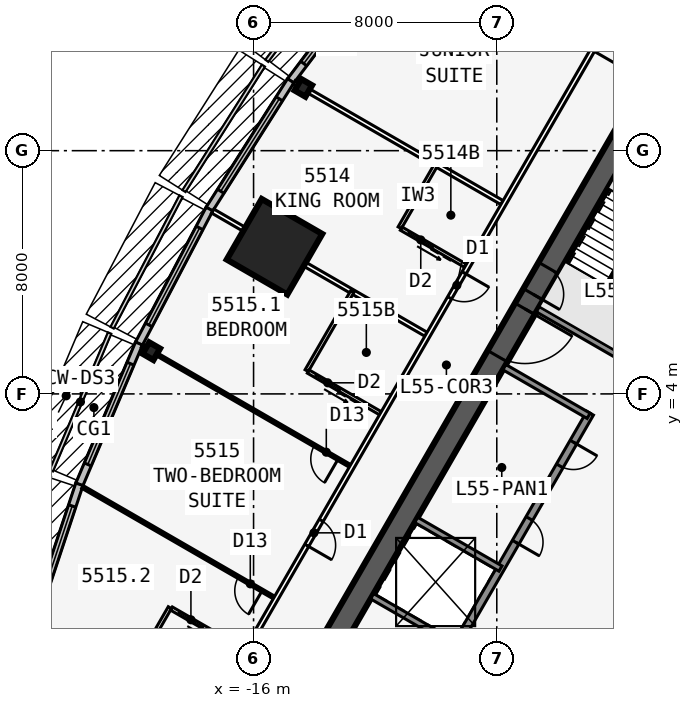
"""IFC4 building model, lengths in metres.
Left out: names, types, materials, properties, quantities, classifications, styles, units other than length and angle.
Written with IfcOpenShell. Run it as: python <this file> out.ifc"""

import sys

from ifc_helpers import new_model, si_unit, direction, frame, frame_2d, origin, origin_2d, place, context, subcontext, project, spatial, rectangle, i_section, extrude, element, fill, save


model = new_model("IFC4")
c1 = context("Model", 3, precision=1e-05, world=origin(), true_north=direction((0.0, 1.0)))
c2 = subcontext(c1, "Body", "Model", "MODEL_VIEW")
j1 = project(units=[si_unit("LENGTHUNIT", "METRE"), si_unit("PLANEANGLEUNIT", "RADIAN")], contexts=[c1])
p1 = place(None, origin())
s1 = spatial("IfcSite", under=j1, at=p1, CompositionType="ELEMENT")
p2 = place(p1, origin())
s2 = spatial("IfcBuilding", under=s1, at=p2, CompositionType="ELEMENT")
p3 = place(p2, frame((0.0, 0.0, 208.1)))
s3 = spatial("IfcBuildingStorey", under=s2, at=p3, CompositionType="ELEMENT", Elevation=208.1)
p4 = place(p3, frame((0.0, 19.052, 0.0), z_axis=(0.0, 0.0, 1.0), x_axis=(-0.499999749417, -0.866025548458, 0.0)))
e1 = element("IfcWall", 1, at=p4, inside=s3, PredefinedType="SHEAR", context=c2, shape_type="SweptSolid", body=[
    extrude(rectangle(XDim=33.0, YDim=0.75, at=frame_2d((16.5, 0.0))), origin(), (0.0, 0.0, 1.0), 3.6),
])
p5 = place(p4, frame((14.15, 0.0, 0.0)))
e2 = element("IfcOpeningElement", 2, at=p5, cuts=e1, PredefinedType="OPENING", context=c2, shape_type="SweptSolid", body=[
    extrude(rectangle(XDim=1.8, YDim=2.13, at=frame_2d((0.9, 1.065))), frame((0.0, 0.385, 0.0), z_axis=(0.0, -1.0, 0.0), x_axis=(1.0, 0.0, 0.0)), (0.0, 0.0, 1.0), 0.77),
])
p6 = place(p4, frame((12.6, 0.0, 0.0)))
e3 = element("IfcOpeningElement", 3, at=p6, cuts=e1, PredefinedType="OPENING", context=c2, shape_type="SweptSolid", body=[
    extrude(rectangle(XDim=1.0, YDim=2.13, at=frame_2d((0.5, 1.065))), frame((0.0, 0.385, 0.0), z_axis=(0.0, -1.0, 0.0), x_axis=(1.0, 0.0, 0.0)), (0.0, 0.0, 1.0), 0.77),
])
p7 = place(p3, frame((-4.929, 3.365, 0.0), z_axis=(0.0, 0.0, 1.0), x_axis=(-0.499991433582, -0.866030349552, 0.0)))
e4 = element("IfcWall", 4, at=p7, inside=s3, PredefinedType="SOLIDWALL", context=c2, shape_type="SweptSolid", body=[
    extrude(rectangle(XDim=10.633, YDim=0.25, at=frame_2d((5.316, 0.0))), origin(), (0.0, 0.0, 1.0), 3.435),
])
p8 = place(p7, frame((9.164, 0.0, 0.0)))
e5 = element("IfcOpeningElement", 5, at=p8, cuts=e4, PredefinedType="OPENING", context=c2, shape_type="SweptSolid", body=[
    extrude(rectangle(XDim=0.9, YDim=2.13, at=frame_2d((0.45, 1.065))), frame((0.0, 0.135, 0.0), z_axis=(0.0, -1.0, 0.0), x_axis=(1.0, 0.0, 0.0)), (0.0, 0.0, 1.0), 0.27),
])
p9 = place(p7, frame((1.1, 0.0, 0.0)))
e6 = element("IfcOpeningElement", 6, at=p9, cuts=e4, PredefinedType="OPENING", context=c2, shape_type="SweptSolid", body=[
    extrude(rectangle(XDim=0.9, YDim=2.13, at=frame_2d((0.45, 1.065))), frame((0.0, 0.135, 0.0), z_axis=(0.0, -1.0, 0.0), x_axis=(1.0, 0.0, 0.0)), (0.0, 0.0, 1.0), 0.27),
])
p10 = place(p7, frame((4.0, 0.0, 0.0)))
e7 = element("IfcOpeningElement", 7, at=p10, cuts=e4, PredefinedType="OPENING", context=c2, shape_type="SweptSolid", body=[
    extrude(rectangle(XDim=0.9, YDim=2.13, at=frame_2d((0.45, 1.065))), frame((0.0, 0.135, 0.0), z_axis=(0.0, -1.0, 0.0), x_axis=(1.0, 0.0, 0.0)), (0.0, 0.0, 1.0), 0.27),
])
for number, where, z_axis, x_axis in (
    (8, (-3.879, 5.184, 0.0), (0.0, 0.0, 1.0), (-0.866, 0.5, 0.0)),
    (9, (-4.979, 3.279, 0.0), (0.0, 0.0, 1.0), (-0.866, 0.5, 0.0)),
    (10, (-7.879, -1.744, 0.0), (0.0, 0.0, 1.0), (-0.866, 0.5, 0.0)),
):
    element("IfcWall", number, at=place(p3, frame(where, z_axis=z_axis, x_axis=x_axis)), inside=s3, PredefinedType="SOLIDWALL", context=c2, shape_type="SweptSolid", body=[
        extrude(rectangle(XDim=3.2, YDim=0.2, at=frame_2d((1.6, 0.0))), origin(), (0.0, 0.0, 1.0), 3.435),
    ])
p11 = place(p3, frame((-9.329, -4.256, 0.0), z_axis=(0.0, 0.0, 1.0), x_axis=(-0.866022944154, 0.50000426018, 0.0)))
e11 = element("IfcWall", 11, at=p11, inside=s3, PredefinedType="SOLIDWALL", context=c2, shape_type="SweptSolid", body=[
    extrude(rectangle(XDim=3.2, YDim=0.2, at=frame_2d((1.6, 0.0))), origin(), (0.0, 0.0, 1.0), 3.435),
])
for number, where, z_axis, x_axis in (
    (12, (-14.363, 14.066, 0.0), (0.0, 0.0, 1.0), (-0.866, 0.5, 0.0)),
    (13, (-19.363, 5.406, 0.0), (0.0, 0.0, 1.0), (-0.866, 0.5, 0.0)),
):
    element("IfcColumn", number, at=place(p3, frame(where, z_axis=z_axis, x_axis=x_axis)), inside=s3, PredefinedType="COLUMN", context=c2, shape_type="SweptSolid", body=[
        extrude(i_section(OverallWidth=0.411, OverallDepth=0.434, WebThickness=0.036, FlangeThickness=0.057, at=origin_2d()), origin(), (0.0, 0.0, 1.0), 3.6),
    ])
p12 = place(p3, frame((-15.312, 8.84, 0.0), z_axis=(0.0, 0.0, 1.0), x_axis=(-0.866025403784, 0.5, 0.0)))
e14 = element("IfcColumn", 14, at=p12, inside=s3, PredefinedType="COLUMN", context=c2, shape_type="SweptSolid", body=[
    extrude(rectangle(XDim=2.3, YDim=2.3, at=origin_2d()), origin(), (0.0, 0.0, 1.0), 3.6),
])
p13 = place(p3, frame((-11.748, 18.312, 0.0), z_axis=(0.0, 0.0, 1.0), x_axis=(-0.602408653511, -0.798187831388, 0.0)))
e15 = element("IfcWall", 15, at=p13, inside=s3, PredefinedType="STANDARD", context=c2, shape_type="SweptSolid", body=[
    extrude(rectangle(XDim=5.038, YDim=0.25, at=frame_2d((2.519, 0.0))), origin(), (0.0, 0.0, 1.0), 3.435),
])
p14 = place(p13, frame((0.719, 0.0, 0.45)))
e16 = element("IfcOpeningElement", 16, at=p14, cuts=e15, PredefinedType="OPENING", context=c2, shape_type="SweptSolid", body=[
    extrude(rectangle(XDim=3.6, YDim=2.6, at=frame_2d((1.8, 1.3))), frame((0.0, 0.135, 0.0), z_axis=(0.0, -1.0, 0.0), x_axis=(1.0, 0.0, 0.0)), (0.0, 0.0, 1.0), 0.27),
])
p15 = place(p3, frame((-14.777, 14.299, 0.0), z_axis=(0.0, 0.0, 1.0), x_axis=(-0.535220361449, -0.844712474568, 0.0)))
e17 = element("IfcWall", 17, at=p15, inside=s3, PredefinedType="STANDARD", context=c2, shape_type="SweptSolid", body=[
    extrude(rectangle(XDim=5.004, YDim=0.25, at=frame_2d((2.502, 0.0))), origin(), (0.0, 0.0, 1.0), 3.435),
])
p16 = place(p15, frame((0.702, 0.0, 0.45)))
e18 = element("IfcOpeningElement", 18, at=p16, cuts=e17, PredefinedType="OPENING", context=c2, shape_type="SweptSolid", body=[
    extrude(rectangle(XDim=3.6, YDim=2.6, at=frame_2d((1.8, 1.3))), frame((0.0, 0.135, 0.0), z_axis=(0.0, -1.0, 0.0), x_axis=(1.0, 0.0, 0.0)), (0.0, 0.0, 1.0), 0.27),
])
p17 = place(p3, frame((-17.45, 10.081, 0.0), z_axis=(0.0, 0.0, 1.0), x_axis=(-0.463976002579, -0.885847768542, 0.0)))
e19 = element("IfcWall", 19, at=p17, inside=s3, PredefinedType="STANDARD", context=c2, shape_type="SweptSolid", body=[
    extrude(rectangle(XDim=5.004, YDim=0.25, at=frame_2d((2.502, 0.0))), origin(), (0.0, 0.0, 1.0), 3.435),
])
p18 = place(p17, frame((0.702, 0.0, 0.45)))
e20 = element("IfcOpeningElement", 20, at=p18, cuts=e19, PredefinedType="OPENING", context=c2, shape_type="SweptSolid", body=[
    extrude(rectangle(XDim=3.6, YDim=2.6, at=frame_2d((1.8, 1.3))), frame((0.0, 0.135, 0.0), z_axis=(0.0, -1.0, 0.0), x_axis=(1.0, 0.0, 0.0)), (0.0, 0.0, 1.0), 0.27),
])
p19 = place(p3, frame((-19.768, 5.657, 0.0), z_axis=(0.0, 0.0, 1.0), x_axis=(-0.390096809471, -0.920773848044, 0.0)))
e21 = element("IfcWall", 21, at=p19, inside=s3, PredefinedType="STANDARD", context=c2, shape_type="SweptSolid", body=[
    extrude(rectangle(XDim=5.038, YDim=0.25, at=frame_2d((2.519, 0.0))), origin(), (0.0, 0.0, 1.0), 3.435),
])
p20 = place(p19, frame((0.719, 0.0, 0.45)))
e22 = element("IfcOpeningElement", 22, at=p20, cuts=e21, PredefinedType="OPENING", context=c2, shape_type="SweptSolid", body=[
    extrude(rectangle(XDim=3.6, YDim=2.6, at=frame_2d((1.8, 1.3))), frame((0.0, 0.135, 0.0), z_axis=(0.0, -1.0, 0.0), x_axis=(1.0, 0.0, 0.0)), (0.0, 0.0, 1.0), 0.27),
])
p21 = place(p3, frame((-21.729, 1.028, 0.0), z_axis=(0.0, 0.0, 1.0), x_axis=(-0.315108478109, -0.949055660656, 0.0)))
e23 = element("IfcWall", 23, at=p21, inside=s3, PredefinedType="STANDARD", context=c2, shape_type="SweptSolid", body=[
    extrude(rectangle(XDim=5.105, YDim=0.25, at=frame_2d((2.552, 0.0))), origin(), (0.0, 0.0, 1.0), 3.435),
])
p22 = place(p21, frame((0.752, 0.0, 0.45)))
e24 = element("IfcOpeningElement", 24, at=p22, cuts=e23, PredefinedType="OPENING", context=c2, shape_type="SweptSolid", body=[
    extrude(rectangle(XDim=3.6, YDim=2.6, at=frame_2d((1.8, 1.3))), frame((0.0, 0.135, 0.0), z_axis=(0.0, -1.0, 0.0), x_axis=(1.0, 0.0, 0.0)), (0.0, 0.0, 1.0), 0.27),
])
p23 = place(p3, frame((-0.425, 22.966, 0.0), z_axis=(0.0, 0.0, 1.0), x_axis=(-0.500000265775, -0.866025250339, 0.0)))
e25 = element("IfcWall", 25, at=p23, inside=s3, PredefinedType="PARTITIONING", context=c2, shape_type="SweptSolid", body=[
    extrude(rectangle(XDim=39.354, YDim=0.15, at=frame_2d((19.677, 0.0))), origin(), (0.0, 0.0, 1.0), 3.435),
])
p24 = place(p23, frame((1.102, 0.0, 0.0)))
e26 = element("IfcOpeningElement", 26, at=p24, cuts=e25, PredefinedType="OPENING", context=c2, shape_type="SweptSolid", body=[
    extrude(rectangle(XDim=0.95, YDim=2.13, at=frame_2d((0.475, 1.065))), frame((0.0, 0.085, 0.0), z_axis=(0.0, -1.0, 0.0), x_axis=(1.0, 0.0, 0.0)), (0.0, 0.0, 1.0), 0.17),
])
p25 = place(p23, frame((7.902, 0.0, 0.0)))
e27 = element("IfcOpeningElement", 27, at=p25, cuts=e25, PredefinedType="OPENING", context=c2, shape_type="SweptSolid", body=[
    extrude(rectangle(XDim=0.95, YDim=2.13, at=frame_2d((0.475, 1.065))), frame((0.0, 0.085, 0.0), z_axis=(0.0, -1.0, 0.0), x_axis=(1.0, 0.0, 0.0)), (0.0, 0.0, 1.0), 0.17),
])
p26 = place(p23, frame((17.302, 0.0, 0.0)))
e28 = element("IfcOpeningElement", 28, at=p26, cuts=e25, PredefinedType="OPENING", context=c2, shape_type="SweptSolid", body=[
    extrude(rectangle(XDim=0.95, YDim=2.13, at=frame_2d((0.475, 1.065))), frame((0.0, 0.085, 0.0), z_axis=(0.0, -1.0, 0.0), x_axis=(1.0, 0.0, 0.0)), (0.0, 0.0, 1.0), 0.17),
])
p27 = place(p23, frame((26.702, 0.0, 0.0)))
e29 = element("IfcOpeningElement", 29, at=p27, cuts=e25, PredefinedType="OPENING", context=c2, shape_type="SweptSolid", body=[
    extrude(rectangle(XDim=0.95, YDim=2.13, at=frame_2d((0.475, 1.065))), frame((0.0, 0.085, 0.0), z_axis=(0.0, -1.0, 0.0), x_axis=(1.0, 0.0, 0.0)), (0.0, 0.0, 1.0), 0.17),
])
p28 = place(p23, frame((37.302, 0.0, 0.0)))
e30 = element("IfcOpeningElement", 30, at=p28, cuts=e25, PredefinedType="OPENING", context=c2, shape_type="SweptSolid", body=[
    extrude(rectangle(XDim=0.95, YDim=2.13, at=frame_2d((0.475, 1.065))), frame((0.0, 0.085, 0.0), z_axis=(0.0, -1.0, 0.0), x_axis=(1.0, 0.0, 0.0)), (0.0, 0.0, 1.0), 0.17),
])
p29 = place(p3, frame((-7.829, 10.293, 0.0), z_axis=(0.0, 0.0, 1.0), x_axis=(-0.866030558329, 0.49999107196, 0.0)))
e31 = element("IfcWall", 31, at=p29, inside=s3, PredefinedType="PARTITIONING", context=c2, shape_type="SweptSolid", body=[
    extrude(rectangle(XDim=7.894, YDim=0.15, at=frame_2d((3.947, 0.0))), origin(), (0.0, 0.0, 1.0), 2.589),
])
p30 = place(p3, frame((-10.329, 5.963, 0.0), z_axis=(0.0, 0.0, 1.0), x_axis=(-0.866016460812, 0.500015489362, 0.0)))
e32 = element("IfcWall", 32, at=p30, inside=s3, PredefinedType="PARTITIONING", context=c2, shape_type="SweptSolid", body=[
    extrude(rectangle(XDim=8.101, YDim=0.15, at=frame_2d((4.051, 0.0))), origin(), (0.0, 0.0, 1.0), 2.589),
])
p31 = place(p3, frame((-12.829, 1.633, 0.0), z_axis=(0.0, 0.0, 1.0), x_axis=(-0.866030558329, 0.49999107196, 0.0)))
e33 = element("IfcWall", 33, at=p31, inside=s3, PredefinedType="PARTITIONING", context=c2, shape_type="SweptSolid", body=[
    extrude(rectangle(XDim=7.894, YDim=0.1, at=frame_2d((3.947, 0.0))), origin(), (0.0, 0.0, 1.0), 2.589),
])
p32 = place(p31, frame((0.45, 0.0, 0.0)))
e34 = element("IfcOpeningElement", 34, at=p32, cuts=e33, PredefinedType="OPENING", context=c2, shape_type="SweptSolid", body=[
    extrude(rectangle(XDim=0.9, YDim=2.13, at=frame_2d((0.45, 1.065))), frame((0.0, 0.06, 0.0), z_axis=(0.0, -1.0, 0.0), x_axis=(1.0, 0.0, 0.0)), (0.0, 0.0, 1.0), 0.12),
])
p33 = place(p3, frame((-15.329, -2.697, 0.0), z_axis=(0.0, 0.0, 1.0), x_axis=(-0.866032413668, 0.499987858329, 0.0)))
e35 = element("IfcWall", 35, at=p33, inside=s3, PredefinedType="PARTITIONING", context=c2, shape_type="SweptSolid", body=[
    extrude(rectangle(XDim=7.273, YDim=0.1, at=frame_2d((3.636, 0.0))), origin(), (0.0, 0.0, 1.0), 2.589),
])
p34 = place(p33, frame((0.45, 0.0, 0.0)))
e36 = element("IfcOpeningElement", 36, at=p34, cuts=e35, PredefinedType="OPENING", context=c2, shape_type="SweptSolid", body=[
    extrude(rectangle(XDim=0.9, YDim=2.13, at=frame_2d((0.45, 1.065))), frame((0.0, 0.06, 0.0), z_axis=(0.0, -1.0, 0.0), x_axis=(1.0, 0.0, 0.0)), (0.0, 0.0, 1.0), 0.12),
])
p35 = place(p3, frame((-9.993, 11.543, 0.0), z_axis=(0.0, 0.0, 1.0), x_axis=(-0.500077600433, -0.865980596518, 0.0)))
e37 = element("IfcWall", 37, at=p35, inside=s3, PredefinedType="PLUMBINGWALL", context=c2, shape_type="SweptSolid", body=[
    extrude(rectangle(XDim=2.4, YDim=0.12, at=frame_2d((1.2, 0.0))), origin(), (0.0, 0.0, 1.0), 3.435),
])
p36 = place(p3, frame((-9.029, 8.215, 0.0), z_axis=(0.0, 0.0, 1.0), x_axis=(-0.866023955769, 0.500002508028, 0.0)))
e38 = element("IfcWall", 38, at=p36, inside=s3, PredefinedType="PLUMBINGWALL", context=c2, shape_type="SweptSolid", body=[
    extrude(rectangle(XDim=2.44, YDim=0.12, at=frame_2d((1.22, 0.0))), origin(), (0.0, 0.0, 1.0), 3.435),
])
p37 = place(p36, frame((1.25, 0.0, 0.0)))
e39 = element("IfcOpeningElement", 39, at=p37, cuts=e38, PredefinedType="OPENING", context=c2, shape_type="SweptSolid", body=[
    extrude(rectangle(XDim=0.9, YDim=2.13, at=frame_2d((0.45, 1.065))), frame((0.0, 0.07, 0.0), z_axis=(0.0, -1.0, 0.0), x_axis=(1.0, 0.0, 0.0)), (0.0, 0.0, 1.0), 0.14),
])
p38 = place(p3, frame((-12.753, 7.363, 0.0), z_axis=(0.0, 0.0, 1.0), x_axis=(-0.50002537861, -0.866010750942, 0.0)))
e40 = element("IfcWall", 40, at=p38, inside=s3, PredefinedType="PLUMBINGWALL", context=c2, shape_type="SweptSolid", body=[
    extrude(rectangle(XDim=3.0, YDim=0.12, at=frame_2d((1.5, 0.0))), origin(), (0.0, 0.0, 1.0), 3.435),
])
p39 = place(p3, frame((-11.829, 3.365, 0.0), z_axis=(0.0, 0.0, 1.0), x_axis=(-0.865997131366, 0.500048966069, 0.0)))
e41 = element("IfcWall", 41, at=p39, inside=s3, PredefinedType="PLUMBINGWALL", context=c2, shape_type="SweptSolid", body=[
    extrude(rectangle(XDim=2.74, YDim=0.12, at=frame_2d((1.37, 0.0))), origin(), (0.0, 0.0, 1.0), 3.435),
])
p40 = place(p39, frame((1.55, 0.0, 0.0)))
e42 = element("IfcOpeningElement", 42, at=p40, cuts=e41, PredefinedType="OPENING", context=c2, shape_type="SweptSolid", body=[
    extrude(rectangle(XDim=0.9, YDim=2.13, at=frame_2d((0.45, 1.065))), frame((0.0, 0.07, 0.0), z_axis=(0.0, -1.0, 0.0), x_axis=(1.0, 0.0, 0.0)), (0.0, 0.0, 1.0), 0.14),
])
p41 = place(p3, frame((-18.753, -3.029, 0.0), z_axis=(0.0, 0.0, 1.0), x_axis=(-0.50002537861, -0.866010750942, 0.0)))
e43 = element("IfcWall", 43, at=p41, inside=s3, PredefinedType="PLUMBINGWALL", context=c2, shape_type="SweptSolid", body=[
    extrude(rectangle(XDim=3.0, YDim=0.12, at=frame_2d((1.5, 0.0))), origin(), (0.0, 0.0, 1.0), 3.435),
])
p42 = place(p3, frame((-16.329, -4.429, 0.0), z_axis=(0.0, 0.0, 1.0), x_axis=(-0.865997131366, 0.500048966069, 0.0)))
e44 = element("IfcWall", 44, at=p42, inside=s3, PredefinedType="PLUMBINGWALL", context=c2, shape_type="SweptSolid", body=[
    extrude(rectangle(XDim=2.74, YDim=0.12, at=frame_2d((1.37, 0.0))), origin(), (0.0, 0.0, 1.0), 3.435),
])
p43 = place(p42, frame((1.55, 0.0, 0.0)))
e45 = element("IfcOpeningElement", 45, at=p43, cuts=e44, PredefinedType="OPENING", context=c2, shape_type="SweptSolid", body=[
    extrude(rectangle(XDim=0.9, YDim=2.13, at=frame_2d((0.45, 1.065))), frame((0.0, 0.07, 0.0), z_axis=(0.0, -1.0, 0.0), x_axis=(1.0, 0.0, 0.0)), (0.0, 0.0, 1.0), 0.14),
])
p44 = place(p3, frame((-2.988, 9.978, 0.0), z_axis=(0.0, 0.0, 1.0), x_axis=(-0.499992232847, -0.866029888106, 0.0)))
e46 = element("IfcWall", 46, at=p44, inside=s3, PredefinedType="SOLIDWALL", context=c2, shape_type="SweptSolid", body=[
    extrude(rectangle(XDim=2.794, YDim=0.1, at=frame_2d((1.397, 0.0))), origin(), (0.0, 0.0, 1.0), 3.6),
])
p45 = place(p14, origin())
e47 = element("IfcWindow", 47, at=p45, inside=s3, PartitioningType="SINGLE_PANEL", PredefinedType="WINDOW", context=c2, shape_type="SweptSolid", body=[
    extrude(rectangle(XDim=3.6, YDim=2.6, at=frame_2d((1.8, 1.3))), frame((0.0, 0.03, 0.0), z_axis=(0.0, -1.0, 0.0), x_axis=(1.0, 0.0, 0.0)), (0.0, 0.0, 1.0), 0.06),
])
fill(e16, e47)
p46 = place(p16, origin())
e48 = element("IfcWindow", 48, at=p46, inside=s3, PartitioningType="SINGLE_PANEL", PredefinedType="WINDOW", context=c2, shape_type="SweptSolid", body=[
    extrude(rectangle(XDim=3.6, YDim=2.6, at=frame_2d((1.8, 1.3))), frame((0.0, 0.03, 0.0), z_axis=(0.0, -1.0, 0.0), x_axis=(1.0, 0.0, 0.0)), (0.0, 0.0, 1.0), 0.06),
])
fill(e18, e48)
p47 = place(p18, origin())
e49 = element("IfcWindow", 49, at=p47, inside=s3, PartitioningType="SINGLE_PANEL", PredefinedType="WINDOW", context=c2, shape_type="SweptSolid", body=[
    extrude(rectangle(XDim=3.6, YDim=2.6, at=frame_2d((1.8, 1.3))), frame((0.0, 0.03, 0.0), z_axis=(0.0, -1.0, 0.0), x_axis=(1.0, 0.0, 0.0)), (0.0, 0.0, 1.0), 0.06),
])
fill(e20, e49)
p48 = place(p20, origin())
e50 = element("IfcWindow", 50, at=p48, inside=s3, PartitioningType="SINGLE_PANEL", PredefinedType="WINDOW", context=c2, shape_type="SweptSolid", body=[
    extrude(rectangle(XDim=3.6, YDim=2.6, at=frame_2d((1.8, 1.3))), frame((0.0, 0.03, 0.0), z_axis=(0.0, -1.0, 0.0), x_axis=(1.0, 0.0, 0.0)), (0.0, 0.0, 1.0), 0.06),
])
fill(e22, e50)
p49 = place(p22, origin())
e51 = element("IfcWindow", 51, at=p49, inside=s3, PartitioningType="SINGLE_PANEL", PredefinedType="WINDOW", context=c2, shape_type="SweptSolid", body=[
    extrude(rectangle(XDim=3.6, YDim=2.6, at=frame_2d((1.8, 1.3))), frame((0.0, 0.03, 0.0), z_axis=(0.0, -1.0, 0.0), x_axis=(1.0, 0.0, 0.0)), (0.0, 0.0, 1.0), 0.06),
])
fill(e24, e51)
p50 = place(p32, origin())
e52 = element("IfcDoor", 52, at=p50, inside=s3, OperationType="SINGLE_SWING_LEFT", PredefinedType="DOOR", context=c2, shape_type="SweptSolid", body=[
    extrude(rectangle(XDim=0.9, YDim=2.13, at=frame_2d((0.45, 1.065))), frame((0.0, 0.025, 0.0), z_axis=(0.0, -1.0, 0.0), x_axis=(1.0, 0.0, 0.0)), (0.0, 0.0, 1.0), 0.05),
])
fill(e34, e52)
p51 = place(p34, origin())
e53 = element("IfcDoor", 53, at=p51, inside=s3, OperationType="SINGLE_SWING_LEFT", PredefinedType="DOOR", context=c2, shape_type="SweptSolid", body=[
    extrude(rectangle(XDim=0.9, YDim=2.13, at=frame_2d((0.45, 1.065))), frame((0.0, 0.025, 0.0), z_axis=(0.0, -1.0, 0.0), x_axis=(1.0, 0.0, 0.0)), (0.0, 0.0, 1.0), 0.05),
])
fill(e36, e53)
p52 = place(p37, origin())
e54 = element("IfcDoor", 54, at=p52, inside=s3, OperationType="SLIDING_TO_LEFT", PredefinedType="DOOR", context=c2, shape_type="SweptSolid", body=[
    extrude(rectangle(XDim=0.9, YDim=2.13, at=frame_2d((0.45, 1.065))), frame((0.0, 0.025, 0.0), z_axis=(0.0, -1.0, 0.0), x_axis=(1.0, 0.0, 0.0)), (0.0, 0.0, 1.0), 0.05),
])
fill(e39, e54)
p53 = place(p26, origin())
e55 = element("IfcDoor", 55, at=p53, inside=s3, OperationType="SINGLE_SWING_LEFT", PredefinedType="DOOR", context=c2, shape_type="SweptSolid", body=[
    extrude(rectangle(XDim=0.95, YDim=2.13, at=frame_2d((0.475, 1.065))), frame((0.0, 0.025, 0.0), z_axis=(0.0, -1.0, 0.0), x_axis=(1.0, 0.0, 0.0)), (0.0, 0.0, 1.0), 0.05),
])
fill(e28, e55)
p54 = place(p40, origin())
e56 = element("IfcDoor", 56, at=p54, inside=s3, OperationType="SLIDING_TO_LEFT", PredefinedType="DOOR", context=c2, shape_type="SweptSolid", body=[
    extrude(rectangle(XDim=0.9, YDim=2.13, at=frame_2d((0.45, 1.065))), frame((0.0, 0.025, 0.0), z_axis=(0.0, -1.0, 0.0), x_axis=(1.0, 0.0, 0.0)), (0.0, 0.0, 1.0), 0.05),
])
fill(e42, e56)
p55 = place(p27, origin())
e57 = element("IfcDoor", 57, at=p55, inside=s3, OperationType="SINGLE_SWING_RIGHT", PredefinedType="DOOR", context=c2, shape_type="SweptSolid", body=[
    extrude(rectangle(XDim=0.95, YDim=2.13, at=frame_2d((0.475, 1.065))), frame((0.0, 0.025, 0.0), z_axis=(0.0, -1.0, 0.0), x_axis=(1.0, 0.0, 0.0)), (0.0, 0.0, 1.0), 0.05),
])
fill(e29, e57)
p56 = place(p43, origin())
e58 = element("IfcDoor", 58, at=p56, inside=s3, OperationType="SLIDING_TO_LEFT", PredefinedType="DOOR", context=c2, shape_type="SweptSolid", body=[
    extrude(rectangle(XDim=0.9, YDim=2.13, at=frame_2d((0.45, 1.065))), frame((0.0, 0.025, 0.0), z_axis=(0.0, -1.0, 0.0), x_axis=(1.0, 0.0, 0.0)), (0.0, 0.0, 1.0), 0.05),
])
fill(e45, e58)
p57 = place(p5, origin())
e59 = element("IfcDoor", 59, at=p57, inside=s3, OperationType="DOUBLE_DOOR_SINGLE_SWING", PredefinedType="DOOR", context=c2, shape_type="SweptSolid", body=[
    extrude(rectangle(XDim=1.8, YDim=2.13, at=frame_2d((0.9, 1.065))), frame((0.0, 0.025, 0.0), z_axis=(0.0, -1.0, 0.0), x_axis=(1.0, 0.0, 0.0)), (0.0, 0.0, 1.0), 0.05),
])
fill(e2, e59)
p58 = place(p6, origin())
e60 = element("IfcDoor", 60, at=p58, inside=s3, OperationType="SINGLE_SWING_RIGHT", PredefinedType="DOOR", context=c2, shape_type="SweptSolid", body=[
    extrude(rectangle(XDim=1.0, YDim=2.13, at=frame_2d((0.5, 1.065))), frame((0.0, 0.025, 0.0), z_axis=(0.0, -1.0, 0.0), x_axis=(1.0, 0.0, 0.0)), (0.0, 0.0, 1.0), 0.05),
])
fill(e3, e60)
p59 = place(p9, origin())
e61 = element("IfcDoor", 61, at=p59, inside=s3, OperationType="SINGLE_SWING_LEFT", PredefinedType="DOOR", context=c2, shape_type="SweptSolid", body=[
    extrude(rectangle(XDim=0.9, YDim=2.13, at=frame_2d((0.45, 1.065))), frame((0.0, 0.025, 0.0), z_axis=(0.0, -1.0, 0.0), x_axis=(1.0, 0.0, 0.0)), (0.0, 0.0, 1.0), 0.05),
])
fill(e6, e61)
p60 = place(p10, origin())
e62 = element("IfcDoor", 62, at=p60, inside=s3, OperationType="SINGLE_SWING_RIGHT", PredefinedType="DOOR", context=c2, shape_type="SweptSolid", body=[
    extrude(rectangle(XDim=0.9, YDim=2.13, at=frame_2d((0.45, 1.065))), frame((0.0, 0.025, 0.0), z_axis=(0.0, -1.0, 0.0), x_axis=(1.0, 0.0, 0.0)), (0.0, 0.0, 1.0), 0.05),
])
fill(e7, e62)
save(model, sys.argv[1])
